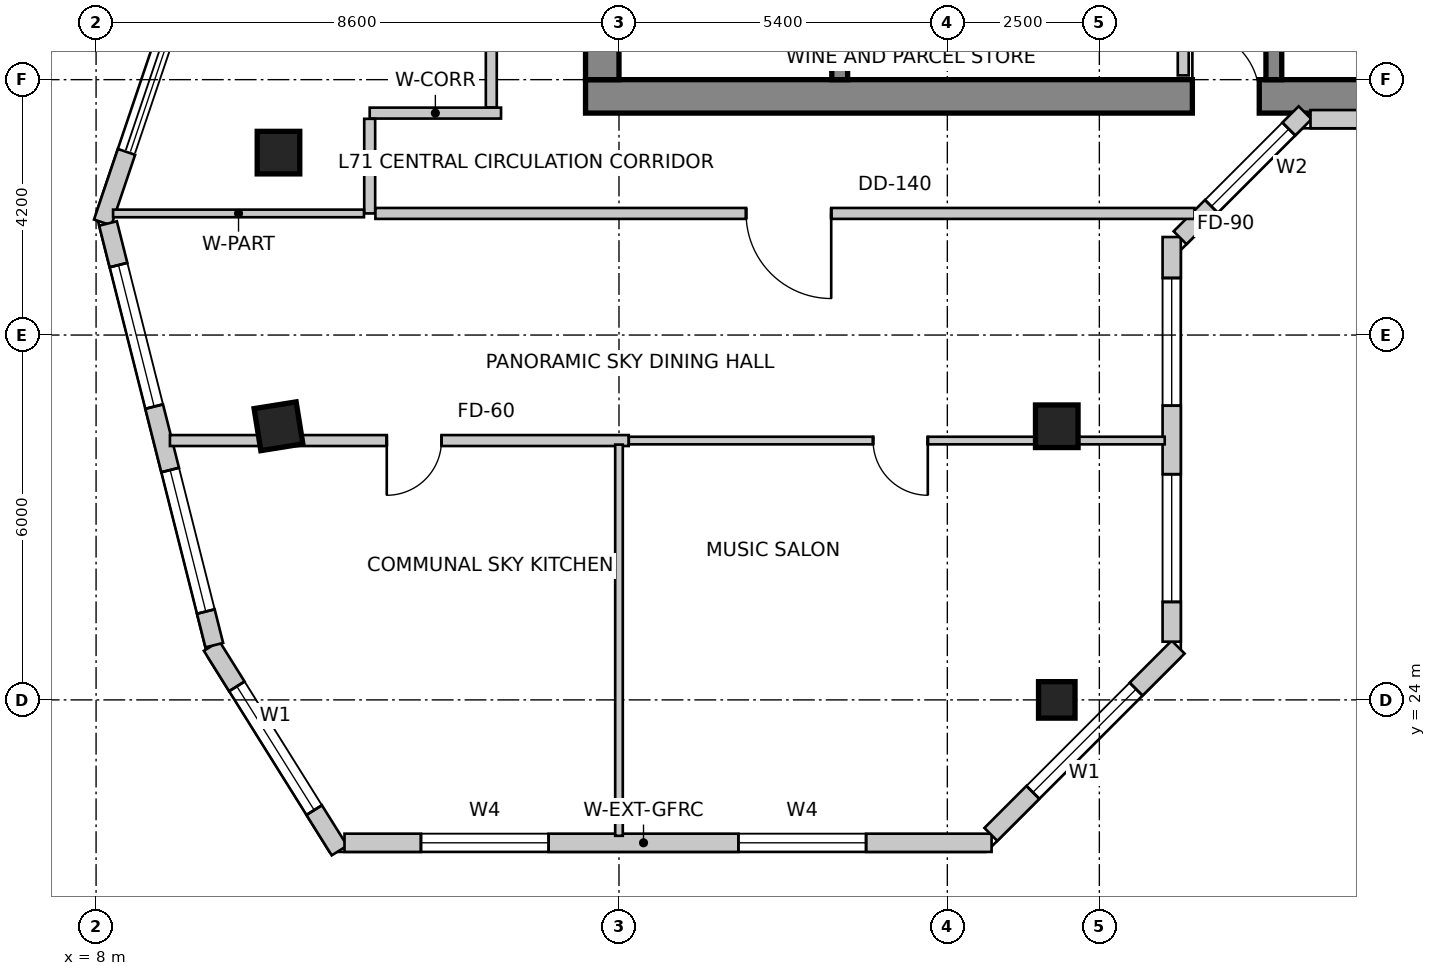
"""IFC4 building model, lengths in metres.
Left out: names, types, materials, properties, quantities, classifications, styles, units other than length and angle.
Written with IfcOpenShell. Run it as: python <this file> out.ifc"""

import sys

from ifc_helpers import new_model, si_unit, direction, frame, frame_2d, origin, origin_2d, place, context, subcontext, project, spatial, rectangle, extrude, source, transform, mapped, element, fill, save


model = new_model("IFC4")
c1 = context("Model", 3, precision=1e-05, world=origin(), true_north=direction((0.0, 1.0)))
c2 = subcontext(c1, "Body", "Model", "MODEL_VIEW")
j1 = project(units=[si_unit("LENGTHUNIT", "METRE"), si_unit("PLANEANGLEUNIT", "RADIAN")], contexts=[c1])
p1 = place(None, origin())
s1 = spatial("IfcSite", under=j1, at=p1, CompositionType="ELEMENT")
p2 = place(p1, origin())
s2 = spatial("IfcBuilding", under=s1, at=p2, CompositionType="ELEMENT")
p3 = place(p2, frame((0.0, 0.0, 278.1)))
s3 = spatial("IfcBuildingStorey", under=s2, at=p3, CompositionType="ELEMENT", Elevation=278.1)
p4 = place(p3, frame((16.05, 33.925, 0.0), z_axis=(0.0, 0.0, 1.0), x_axis=(1.0, 0.0, 0.0)))
e1 = element("IfcWall", 1, at=p4, inside=s3, PredefinedType="SHEAR", context=c2, shape_type="SweptSolid", body=[
    extrude(rectangle(XDim=15.5, YDim=0.55, at=frame_2d((7.75, 0.0))), origin(), (0.0, 0.0, 1.0), 3.6),
])
m1 = source(origin(), c2, "Body", "SweptSolid", [
    extrude(rectangle(XDim=1.1, YDim=2.15, at=frame_2d((0.55, 1.075))), frame((0.0, 0.285, 0.0), z_axis=(0.0, -1.0, 0.0), x_axis=(1.0, 0.0, 0.0)), (0.0, 0.0, 1.0), 0.57),
])
p5 = place(p4, frame((9.98, 0.0, 0.0)))
e2 = element("IfcOpeningElement", 2, at=p5, cuts=e1, PredefinedType="OPENING", context=c2, shape_type="MappedRepresentation", body=[
    mapped(m1, transform((0.0, 0.0, 0.0), scale=1.0)),
])
p6 = place(p3, frame((16.325, 34.2, 0.0), z_axis=(0.0, 0.0, 1.0), x_axis=(0.0, 1.0, 0.0)))
e3 = element("IfcWall", 3, at=p6, inside=s3, PredefinedType="SHEAR", context=c2, shape_type="SweptSolid", body=[
    extrude(rectangle(XDim=11.4, YDim=0.55, at=frame_2d((5.7, 0.0))), origin(), (0.0, 0.0, 1.0), 3.6),
])
p7 = place(p6, frame((7.15, 0.0, 0.0)))
e4 = element("IfcOpeningElement", 4, at=p7, cuts=e3, PredefinedType="OPENING", context=c2, shape_type="MappedRepresentation", body=[
    mapped(m1, transform((0.0, 0.0, 0.0), scale=1.0)),
])
p8 = place(p3, frame((20.23, 34.2, 0.0), z_axis=(0.0, 0.0, 1.0), x_axis=(0.0, 1.0, 0.0)))
e5 = element("IfcWall", 5, at=p8, inside=s3, PredefinedType="SHEAR", context=c2, shape_type="SweptSolid", body=[
    extrude(rectangle(XDim=9.06, YDim=0.26, at=frame_2d((4.53, 0.0))), origin(), (0.0, 0.0, 1.0), 3.6),
])
m2 = source(origin(), c2, "Body", "SweptSolid", [
    extrude(rectangle(XDim=1.1, YDim=2.15, at=frame_2d((0.55, 1.075))), frame((0.0, 0.14, 0.0), z_axis=(0.0, -1.0, 0.0), x_axis=(1.0, 0.0, 0.0)), (0.0, 0.0, 1.0), 0.28),
])
p9 = place(p8, frame((7.45, 0.0, 0.0)))
e6 = element("IfcOpeningElement", 6, at=p9, cuts=e5, PredefinedType="OPENING", context=c2, shape_type="MappedRepresentation", body=[
    mapped(m2, transform((0.0, 0.0, 0.0), scale=1.0)),
])
p10 = place(p3, frame((27.37, 34.2, 0.0), z_axis=(0.0, 0.0, 1.0), x_axis=(0.0, 1.0, 0.0)))
e7 = element("IfcWall", 7, at=p10, inside=s3, PredefinedType="SHEAR", context=c2, shape_type="SweptSolid", body=[
    extrude(rectangle(XDim=9.06, YDim=0.26, at=frame_2d((4.53, 0.0))), origin(), (0.0, 0.0, 1.0), 3.6),
])
p11 = place(p10, frame((7.45, 0.0, 0.0)))
e8 = element("IfcOpeningElement", 8, at=p11, cuts=e7, PredefinedType="OPENING", context=c2, shape_type="MappedRepresentation", body=[
    mapped(m2, transform((0.0, 0.0, 0.0), scale=1.0)),
])
m3 = source(origin(), c2, "Body", "SweptSolid", [
    extrude(rectangle(XDim=0.7, YDim=0.7, at=origin_2d()), origin(), (0.0, 0.0, 1.0), 3.6),
])
for number, where, z_axis, x_axis in (
    (9, (11.0, 33.0, 0.0), (0.0, 0.0, 1.0), (1.0, 0.0, 0.0)),
    (10, (11.0, 28.5, 0.0), (0.0, 0.0, 1.0), (0.158, -0.987, 0.0)),
    (11, (23.8, 28.5, 0.0), (0.0, 0.0, 1.0), (1.0, 0.0, 0.0)),
):
    element("IfcColumn", number, at=place(p3, frame(where, z_axis=z_axis, x_axis=x_axis)), inside=s3, PredefinedType="COLUMN", context=c2, shape_type="MappedRepresentation", body=[
        mapped(m3, transform((0.0, 0.0, 0.0), scale=1.0)),
    ])
m4 = source(origin(), c2, "Body", "SweptSolid", [
    extrude(rectangle(XDim=0.6, YDim=0.6, at=origin_2d()), origin(), (0.0, 0.0, 1.0), 3.6),
])
p12 = place(p3, frame((23.8, 24.0, 0.0), z_axis=(0.0, 0.0, 1.0), x_axis=(1.0, 0.0, 0.0)))
e12 = element("IfcColumn", 12, at=p12, inside=s3, PredefinedType="COLUMN", context=c2, shape_type="MappedRepresentation", body=[
    mapped(m4, transform((0.0, 0.0, 0.0), scale=1.0)),
])
p13 = place(p3, frame((9.9, 24.887, 0.0), z_axis=(0.0, 0.0, 1.0), x_axis=(0.530004471907, -0.84799484654, 0.0)))
e13 = element("IfcWall", 13, at=p13, inside=s3, PredefinedType="SOLIDWALL", context=c2, shape_type="SweptSolid", body=[
    extrude(rectangle(XDim=3.967, YDim=0.3, at=frame_2d((1.983, 0.0))), origin(), (0.0, 0.0, 1.0), 3.35),
])
m5 = source(origin(), c2, "Body", "SweptSolid", [
    extrude(rectangle(XDim=2.4, YDim=2.2, at=frame_2d((1.2, 1.1))), frame((0.0, 0.16, 0.0), z_axis=(0.0, -1.0, 0.0), x_axis=(1.0, 0.0, 0.0)), (0.0, 0.0, 1.0), 0.32),
])
p14 = place(p13, frame((0.783, 0.0, 0.85)))
e14 = element("IfcOpeningElement", 14, at=p14, cuts=e13, PredefinedType="OPENING", context=c2, shape_type="MappedRepresentation", body=[
    mapped(m5, transform((0.0, 0.0, 0.0), scale=1.0)),
])
p15 = place(p3, frame((12.086, 21.65, 0.0), z_axis=(0.0, 0.0, 1.0), x_axis=(1.0, 0.0, 0.0)))
e15 = element("IfcWall", 15, at=p15, inside=s3, PredefinedType="SOLIDWALL", context=c2, shape_type="SweptSolid", body=[
    extrude(rectangle(XDim=10.642, YDim=0.3, at=frame_2d((5.321, 0.0))), origin(), (0.0, 0.0, 1.0), 3.35),
])
m6 = source(origin(), c2, "Body", "SweptSolid", [
    extrude(rectangle(XDim=2.1, YDim=2.0, at=frame_2d((1.05, 1.0))), frame((0.0, 0.16, 0.0), z_axis=(0.0, -1.0, 0.0), x_axis=(1.0, 0.0, 0.0)), (0.0, 0.0, 1.0), 0.32),
])
p16 = place(p15, frame((1.257, 0.0, 0.85)))
e16 = element("IfcOpeningElement", 16, at=p16, cuts=e15, PredefinedType="OPENING", context=c2, shape_type="MappedRepresentation", body=[
    mapped(m6, transform((0.0, 0.0, 0.0), scale=1.0)),
])
p17 = place(p15, frame((6.478, 0.0, 0.85)))
e17 = element("IfcOpeningElement", 17, at=p17, cuts=e15, PredefinedType="OPENING", context=c2, shape_type="MappedRepresentation", body=[
    mapped(m6, transform((0.0, 0.0, 0.0), scale=1.0)),
])
p18 = place(p3, frame((22.716, 21.788, 0.0), z_axis=(0.0, 0.0, 1.0), x_axis=(0.707134803727, 0.707078757535, 0.0)))
e18 = element("IfcWall", 18, at=p18, inside=s3, PredefinedType="SOLIDWALL", context=c2, shape_type="SweptSolid", body=[
    extrude(rectangle(XDim=4.356, YDim=0.3, at=frame_2d((2.178, 0.0))), origin(), (0.0, 0.0, 1.0), 3.35),
])
p19 = place(p18, frame((0.978, 0.0, 0.85)))
e19 = element("IfcOpeningElement", 19, at=p19, cuts=e18, PredefinedType="OPENING", context=c2, shape_type="MappedRepresentation", body=[
    mapped(m5, transform((0.0, 0.0, 0.0), scale=1.0)),
])
p20 = place(p3, frame((25.69, 24.957, 0.0), z_axis=(0.0, 0.0, 1.0), x_axis=(0.0, 1.0, 0.0)))
e20 = element("IfcWall", 20, at=p20, inside=s3, PredefinedType="SOLIDWALL", context=c2, shape_type="SweptSolid", body=[
    extrude(rectangle(XDim=6.655, YDim=0.3, at=frame_2d((3.327, 0.0))), origin(), (0.0, 0.0, 1.0), 3.35),
])
p21 = place(p20, frame((0.654, 0.0, 0.85)))
e21 = element("IfcOpeningElement", 21, at=p21, cuts=e20, PredefinedType="OPENING", context=c2, shape_type="MappedRepresentation", body=[
    mapped(m6, transform((0.0, 0.0, 0.0), scale=1.0)),
])
p22 = place(p20, frame((3.881, 0.0, 0.85)))
e22 = element("IfcOpeningElement", 22, at=p22, cuts=e20, PredefinedType="OPENING", context=c2, shape_type="MappedRepresentation", body=[
    mapped(m6, transform((0.0, 0.0, 0.0), scale=1.0)),
])
p23 = place(p3, frame((25.828, 31.6, 0.0), z_axis=(0.0, 0.0, 1.0), x_axis=(0.707106781187, 0.707106781187, 0.0)))
e23 = element("IfcWall", 23, at=p23, inside=s3, PredefinedType="SOLIDWALL", context=c2, shape_type="SweptSolid", body=[
    extrude(rectangle(XDim=2.907, YDim=0.3, at=frame_2d((1.454, 0.0))), origin(), (0.0, 0.0, 1.0), 3.35),
])
m7 = source(origin(), c2, "Body", "SweptSolid", [
    extrude(rectangle(XDim=1.8, YDim=2.1, at=frame_2d((0.9, 1.05))), frame((0.0, 0.16, 0.0), z_axis=(0.0, -1.0, 0.0), x_axis=(1.0, 0.0, 0.0)), (0.0, 0.0, 1.0), 0.32),
])
p24 = place(p23, frame((0.729, 0.0, 0.85)))
e24 = element("IfcOpeningElement", 24, at=p24, cuts=e23, PredefinedType="OPENING", context=c2, shape_type="MappedRepresentation", body=[
    mapped(m7, transform((0.0, 0.0, 0.0), scale=1.0)),
])
p25 = place(p3, frame((27.973, 33.55, 0.0), z_axis=(0.0, 0.0, 1.0), x_axis=(1.0, 0.0, 0.0)))
e25 = element("IfcWall", 25, at=p25, inside=s3, PredefinedType="SOLIDWALL", context=c2, shape_type="SweptSolid", body=[
    extrude(rectangle(XDim=9.115, YDim=0.3, at=frame_2d((4.558, 0.0))), origin(), (0.0, 0.0, 1.0), 3.35),
])
m8 = source(origin(), c2, "Body", "SweptSolid", [
    extrude(rectangle(XDim=1.6, YDim=2.15, at=frame_2d((0.8, 1.075))), frame((0.0, 0.16, 0.0), z_axis=(0.0, -1.0, 0.0), x_axis=(1.0, 0.0, 0.0)), (0.0, 0.0, 1.0), 0.32),
])
p26 = place(p25, frame((3.647, 0.0, 0.0)))
e26 = element("IfcOpeningElement", 26, at=p26, cuts=e25, PredefinedType="OPENING", context=c2, shape_type="MappedRepresentation", body=[
    mapped(m8, transform((0.0, 0.0, 0.0), scale=1.0)),
])
p27 = place(p25, frame((0.793, 0.0, 0.85)))
e27 = element("IfcOpeningElement", 27, at=p27, cuts=e25, PredefinedType="OPENING", context=c2, shape_type="MappedRepresentation", body=[
    mapped(m6, transform((0.0, 0.0, 0.0), scale=1.0)),
])
p28 = place(p25, frame((6.111, 0.0, 0.85)))
e28 = element("IfcOpeningElement", 28, at=p28, cuts=e25, PredefinedType="OPENING", context=c2, shape_type="MappedRepresentation", body=[
    mapped(m6, transform((0.0, 0.0, 0.0), scale=1.0)),
])
p29 = place(p3, frame((8.5, 33.012, 0.0), z_axis=(0.0, 0.0, 1.0), x_axis=(-0.319872574384, -0.94746057235, 0.0)))
e29 = element("IfcWall", 29, at=p29, inside=s3, PredefinedType="SOLIDWALL", context=c2, shape_type="SweptSolid", body=[
    extrude(rectangle(XDim=1.225, YDim=0.3, at=frame_2d((0.613, 0.0))), origin(), (0.0, 0.0, 1.0), 3.35),
])
p30 = place(p3, frame((8.196, 31.835, 0.0), z_axis=(0.0, 0.0, 1.0), x_axis=(0.244430846523, -0.969666726906, 0.0)))
e30 = element("IfcWall", 30, at=p30, inside=s3, PredefinedType="SOLIDWALL", context=c2, shape_type="SweptSolid", body=[
    extrude(rectangle(XDim=7.152, YDim=0.3, at=frame_2d((3.576, 0.0))), origin(), (0.0, 0.0, 1.0), 3.35),
])
p31 = place(p30, frame((0.705, 0.0, 0.85)))
e31 = element("IfcOpeningElement", 31, at=p31, cuts=e30, PredefinedType="OPENING", context=c2, shape_type="MappedRepresentation", body=[
    mapped(m5, transform((0.0, 0.0, 0.0), scale=1.0)),
])
p32 = place(p30, frame((4.181, 0.0, 0.85)))
e32 = element("IfcOpeningElement", 32, at=p32, cuts=e30, PredefinedType="OPENING", context=c2, shape_type="MappedRepresentation", body=[
    mapped(m5, transform((0.0, 0.0, 0.0), scale=1.0)),
])
p33 = place(p3, frame((25.88, 35.956, 0.0), z_axis=(0.0, 0.0, 1.0), x_axis=(0.0, -1.0, 0.0)))
e33 = element("IfcWall", 33, at=p33, inside=s3, PredefinedType="PARTITIONING", context=c2, shape_type="SweptSolid", body=[
    extrude(rectangle(XDim=1.686, YDim=0.18, at=frame_2d((0.843, 0.0))), origin(), (0.0, 0.0, 1.0), 2.642),
])
p34 = place(p3, frame((12.5, 33.65, 0.0), z_axis=(0.0, 0.0, 1.0), x_axis=(1.0, 0.0, 0.0)))
e34 = element("IfcWall", 34, at=p34, inside=s3, PredefinedType="PARTITIONING", context=c2, shape_type="SweptSolid", body=[
    extrude(rectangle(XDim=2.16, YDim=0.18, at=frame_2d((1.08, 0.0))), origin(), (0.0, 0.0, 1.0), 3.35),
])
p35 = place(p3, frame((12.5, 32.0, 0.0), z_axis=(0.0, 0.0, 1.0), x_axis=(0.0, 1.0, 0.0)))
e35 = element("IfcWall", 35, at=p35, inside=s3, PredefinedType="PARTITIONING", context=c2, shape_type="SweptSolid", body=[
    extrude(rectangle(XDim=1.556, YDim=0.18, at=frame_2d((0.778, 0.0))), origin(), (0.0, 0.0, 1.0), 3.034),
])
p36 = place(p3, frame((26.065, 32.0, 0.0), z_axis=(0.0, 0.0, 1.0), x_axis=(-1.0, 0.0, 0.0)))
e36 = element("IfcWall", 36, at=p36, inside=s3, PredefinedType="PARTITIONING", context=c2, shape_type="SweptSolid", body=[
    extrude(rectangle(XDim=13.471, YDim=0.18, at=frame_2d((6.736, 0.0))), origin(), (0.0, 0.0, 1.0), 3.034),
])
m9 = source(origin(), c2, "Body", "SweptSolid", [
    extrude(rectangle(XDim=1.4, YDim=2.15, at=frame_2d((0.7, 1.075))), frame((0.0, 0.1, 0.0), z_axis=(0.0, -1.0, 0.0), x_axis=(1.0, 0.0, 0.0)), (0.0, 0.0, 1.0), 0.2),
])
p37 = place(p36, frame((5.975, 0.0, 0.0)))
e37 = element("IfcOpeningElement", 37, at=p37, cuts=e36, PredefinedType="OPENING", context=c2, shape_type="MappedRepresentation", body=[
    mapped(m9, transform((0.0, 0.0, 0.0), scale=1.0)),
])
p38 = place(p3, frame((14.5, 33.744, 0.0), z_axis=(0.0, 0.0, 1.0), x_axis=(0.0, 1.0, 0.0)))
e38 = element("IfcWall", 38, at=p38, inside=s3, PredefinedType="PARTITIONING", context=c2, shape_type="SweptSolid", body=[
    extrude(rectangle(XDim=12.406, YDim=0.18, at=frame_2d((6.203, 0.0))), origin(), (0.0, 0.0, 1.0), 3.35),
])
m10 = source(origin(), c2, "Body", "SweptSolid", [
    extrude(rectangle(XDim=0.9, YDim=2.15, at=frame_2d((0.45, 1.075))), frame((0.0, 0.1, 0.0), z_axis=(0.0, -1.0, 0.0), x_axis=(1.0, 0.0, 0.0)), (0.0, 0.0, 1.0), 0.2),
])
p39 = place(p38, frame((4.37, 0.0, 0.0)))
e39 = element("IfcOpeningElement", 39, at=p39, cuts=e38, PredefinedType="OPENING", context=c2, shape_type="MappedRepresentation", body=[
    mapped(m10, transform((0.0, 0.0, 0.0), scale=1.0)),
])
p40 = place(p3, frame((12.406, 32.0, 0.0), z_axis=(0.0, 0.0, 1.0), x_axis=(-1.0, 0.0, 0.0)))
e40 = element("IfcWall", 40, at=p40, inside=s3, PredefinedType="PARTITIONING", context=c2, shape_type="SweptSolid", body=[
    extrude(rectangle(XDim=4.126, YDim=0.125, at=frame_2d((2.063, 0.0))), origin(), (0.0, 0.0, 1.0), 2.642),
])
p41 = place(p3, frame((16.76, 28.265, 0.0), z_axis=(0.0, 0.0, 1.0), x_axis=(-1.0, 0.0, 0.0)))
e41 = element("IfcWall", 41, at=p41, inside=s3, PredefinedType="PARTITIONING", context=c2, shape_type="SweptSolid", body=[
    extrude(rectangle(XDim=7.545, YDim=0.18, at=frame_2d((3.773, 0.0))), origin(), (0.0, 0.0, 1.0), 2.979),
])
p42 = place(p41, frame((3.079, 0.0, 0.0)))
e42 = element("IfcOpeningElement", 42, at=p42, cuts=e41, PredefinedType="OPENING", context=c2, shape_type="MappedRepresentation", body=[
    mapped(m10, transform((0.0, 0.0, 0.0), scale=1.0)),
])
p43 = place(p3, frame((25.575, 28.265, 0.0), z_axis=(0.0, 0.0, 1.0), x_axis=(-1.0, 0.0, 0.0)))
e43 = element("IfcWall", 43, at=p43, inside=s3, PredefinedType="PARTITIONING", context=c2, shape_type="SweptSolid", body=[
    extrude(rectangle(XDim=8.813, YDim=0.125, at=frame_2d((4.406, 0.0))), origin(), (0.0, 0.0, 1.0), 2.642),
])
m11 = source(origin(), c2, "Body", "SweptSolid", [
    extrude(rectangle(XDim=0.9, YDim=2.15, at=frame_2d((0.45, 1.075))), frame((0.0, 0.073, 0.0), z_axis=(0.0, -1.0, 0.0), x_axis=(1.0, 0.0, 0.0)), (0.0, 0.0, 1.0), 0.145),
])
p44 = place(p43, frame((3.896, 0.0, 0.0)))
e44 = element("IfcOpeningElement", 44, at=p44, cuts=e43, PredefinedType="OPENING", context=c2, shape_type="MappedRepresentation", body=[
    mapped(m11, transform((0.0, 0.0, 0.0), scale=1.0)),
])
p45 = place(p3, frame((16.6, 28.198, 0.0), z_axis=(0.0, 0.0, 1.0), x_axis=(0.0, -1.0, 0.0)))
e45 = element("IfcWall", 45, at=p45, inside=s3, PredefinedType="PARTITIONING", context=c2, shape_type="SweptSolid", body=[
    extrude(rectangle(XDim=6.434, YDim=0.125, at=frame_2d((3.217, 0.0))), origin(), (0.0, 0.0, 1.0), 3.034),
])
m12 = source(origin(), c2, "Body", "SweptSolid", [
    extrude(rectangle(XDim=2.4, YDim=2.2, at=frame_2d((1.2, 1.1))), frame((0.0, -0.015, 0.0), z_axis=(0.0, -1.0, 0.0), x_axis=(1.0, 0.0, 0.0)), (0.0, 0.0, 1.0), 0.06),
])
p46 = place(p14, origin())
e46 = element("IfcWindow", 46, at=p46, inside=s3, PartitioningType="SINGLE_PANEL", PredefinedType="WINDOW", context=c2, shape_type="MappedRepresentation", body=[
    mapped(m12, transform((0.0, 0.0, 0.0), scale=1.0)),
])
fill(e14, e46)
m13 = source(origin(), c2, "Body", "SweptSolid", [
    extrude(rectangle(XDim=2.1, YDim=2.0, at=frame_2d((1.05, 1.0))), frame((0.0, -0.015, 0.0), z_axis=(0.0, -1.0, 0.0), x_axis=(1.0, 0.0, 0.0)), (0.0, 0.0, 1.0), 0.06),
])
p47 = place(p16, origin())
e47 = element("IfcWindow", 47, at=p47, inside=s3, PartitioningType="SINGLE_PANEL", PredefinedType="WINDOW", context=c2, shape_type="MappedRepresentation", body=[
    mapped(m13, transform((0.0, 0.0, 0.0), scale=1.0)),
])
fill(e16, e47)
p48 = place(p17, origin())
e48 = element("IfcWindow", 48, at=p48, inside=s3, PartitioningType="SINGLE_PANEL", PredefinedType="WINDOW", context=c2, shape_type="MappedRepresentation", body=[
    mapped(m13, transform((0.0, 0.0, 0.0), scale=1.0)),
])
fill(e17, e48)
p49 = place(p19, origin())
e49 = element("IfcWindow", 49, at=p49, inside=s3, PartitioningType="SINGLE_PANEL", PredefinedType="WINDOW", context=c2, shape_type="MappedRepresentation", body=[
    mapped(m12, transform((0.0, 0.0, 0.0), scale=1.0)),
])
fill(e19, e49)
p50 = place(p21, origin())
e50 = element("IfcWindow", 50, at=p50, inside=s3, PartitioningType="SINGLE_PANEL", PredefinedType="WINDOW", context=c2, shape_type="MappedRepresentation", body=[
    mapped(m13, transform((0.0, 0.0, 0.0), scale=1.0)),
])
fill(e21, e50)
p51 = place(p22, origin())
e51 = element("IfcWindow", 51, at=p51, inside=s3, PartitioningType="SINGLE_PANEL", PredefinedType="WINDOW", context=c2, shape_type="MappedRepresentation", body=[
    mapped(m13, transform((0.0, 0.0, 0.0), scale=1.0)),
])
fill(e22, e51)
m14 = source(origin(), c2, "Body", "SweptSolid", [
    extrude(rectangle(XDim=1.8, YDim=2.1, at=frame_2d((0.9, 1.05))), frame((0.0, -0.015, 0.0), z_axis=(0.0, -1.0, 0.0), x_axis=(1.0, 0.0, 0.0)), (0.0, 0.0, 1.0), 0.06),
])
p52 = place(p24, origin())
e52 = element("IfcWindow", 52, at=p52, inside=s3, PartitioningType="SINGLE_PANEL", PredefinedType="WINDOW", context=c2, shape_type="MappedRepresentation", body=[
    mapped(m14, transform((0.0, 0.0, 0.0), scale=1.0)),
])
fill(e24, e52)
p53 = place(p31, origin())
e53 = element("IfcWindow", 53, at=p53, inside=s3, PartitioningType="SINGLE_PANEL", PredefinedType="WINDOW", context=c2, shape_type="MappedRepresentation", body=[
    mapped(m12, transform((0.0, 0.0, 0.0), scale=1.0)),
])
fill(e31, e53)
p54 = place(p32, origin())
e54 = element("IfcWindow", 54, at=p54, inside=s3, PartitioningType="SINGLE_PANEL", PredefinedType="WINDOW", context=c2, shape_type="MappedRepresentation", body=[
    mapped(m12, transform((0.0, 0.0, 0.0), scale=1.0)),
])
fill(e32, e54)
m15 = source(origin(), c2, "Body", "SweptSolid", [
    extrude(rectangle(XDim=1.1, YDim=2.15, at=frame_2d((0.55, 1.075))), frame((0.0, 0.025, 0.0), z_axis=(0.0, -1.0, 0.0), x_axis=(1.0, 0.0, 0.0)), (0.0, 0.0, 1.0), 0.05),
])
p55 = place(p5, origin())
e55 = element("IfcDoor", 55, at=p55, inside=s3, OperationType="SINGLE_SWING_LEFT", PredefinedType="DOOR", context=c2, shape_type="MappedRepresentation", body=[
    mapped(m15, transform((0.0, 0.0, 0.0), scale=1.0)),
])
fill(e2, e55)
m16 = source(origin(), c2, "Body", "SweptSolid", [
    extrude(rectangle(XDim=1.4, YDim=2.15, at=frame_2d((0.7, 1.075))), frame((0.0, 0.025, 0.0), z_axis=(0.0, -1.0, 0.0), x_axis=(1.0, 0.0, 0.0)), (0.0, 0.0, 1.0), 0.05),
])
p56 = place(p37, origin())
e56 = element("IfcDoor", 56, at=p56, inside=s3, OperationType="SINGLE_SWING_LEFT", PredefinedType="DOOR", context=c2, shape_type="MappedRepresentation", body=[
    mapped(m16, transform((0.0, 0.0, 0.0), scale=1.0)),
])
fill(e37, e56)
m17 = source(origin(), c2, "Body", "SweptSolid", [
    extrude(rectangle(XDim=0.9, YDim=2.15, at=frame_2d((0.45, 1.075))), frame((0.0, 0.025, 0.0), z_axis=(0.0, -1.0, 0.0), x_axis=(1.0, 0.0, 0.0)), (0.0, 0.0, 1.0), 0.05),
])
p57 = place(p42, origin())
e57 = element("IfcDoor", 57, at=p57, inside=s3, OperationType="SINGLE_SWING_RIGHT", PredefinedType="DOOR", context=c2, shape_type="MappedRepresentation", body=[
    mapped(m17, transform((0.0, 0.0, 0.0), scale=1.0)),
])
fill(e42, e57)
m18 = source(origin(), c2, "Body", "SweptSolid", [
    extrude(rectangle(XDim=0.9, YDim=2.15, at=frame_2d((0.45, 1.075))), frame((0.0, 0.025, 0.0), z_axis=(0.0, -1.0, 0.0), x_axis=(1.0, 0.0, 0.0)), (0.0, 0.0, 1.0), 0.05),
])
p58 = place(p44, origin())
e58 = element("IfcDoor", 58, at=p58, inside=s3, OperationType="SINGLE_SWING_LEFT", PredefinedType="DOOR", context=c2, shape_type="MappedRepresentation", body=[
    mapped(m18, transform((0.0, 0.0, 0.0), scale=1.0)),
])
fill(e44, e58)
save(model, sys.argv[1])
